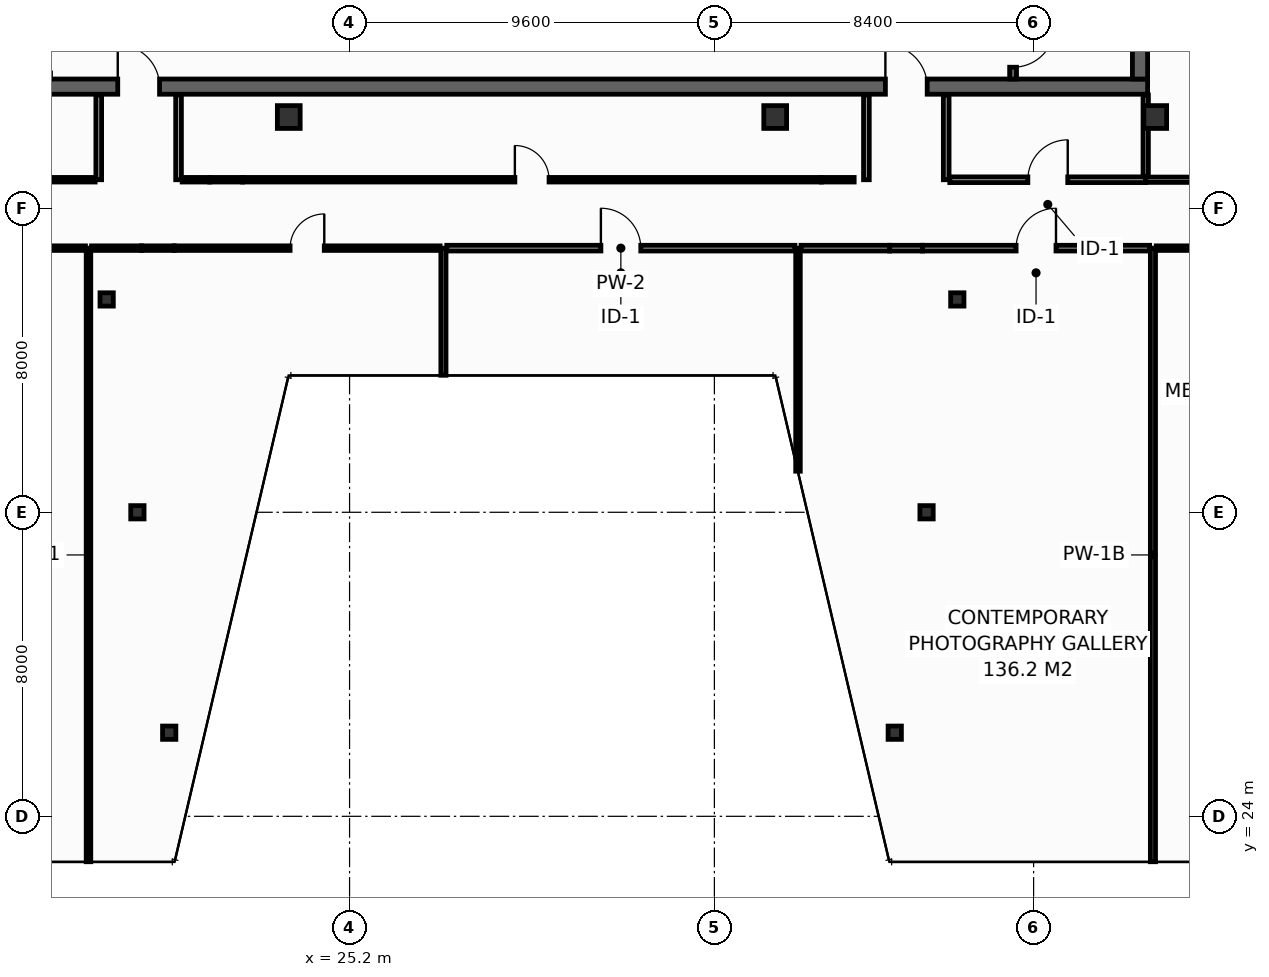
"""IFC4 building model, lengths in metres.
Left out: names, types, materials, properties, quantities, classifications, styles, units other than length and angle.
Written with IfcOpenShell. Run it as: python <this file> out.ifc"""

import sys

from ifc_helpers import new_model, si_unit, direction, frame, frame_2d, origin, origin_2d, place, context, subcontext, project, spatial, rectangle, hollow_rectangle, extrude, element, fill, save


model = new_model("IFC4")
c1 = context("Model", 3, precision=1e-05, world=origin(), true_north=direction((0.0, 1.0)))
c2 = subcontext(c1, "Body", "Model", "MODEL_VIEW")
j1 = project(units=[si_unit("LENGTHUNIT", "METRE"), si_unit("PLANEANGLEUNIT", "RADIAN")], contexts=[c1])
p1 = place(None, origin())
s1 = spatial("IfcSite", under=j1, at=p1, CompositionType="ELEMENT")
p2 = place(p1, origin())
s2 = spatial("IfcBuilding", under=s1, at=p2, CompositionType="ELEMENT")
p3 = place(p2, frame((0.0, 0.0, 272.4)))
s3 = spatial("IfcBuildingStorey", under=s2, at=p3, CompositionType="ELEMENT", Elevation=272.4)
p4 = place(p3, frame((13.7, 43.2, 0.0), z_axis=(0.0, 0.0, 1.0), x_axis=(1.0, 0.0, 0.0)))
e1 = element("IfcWall", 1, at=p4, inside=s3, PredefinedType="SHEAR", context=c2, shape_type="SweptSolid", body=[
    extrude(rectangle(XDim=32.5, YDim=0.4, at=frame_2d((16.25, 0.0))), origin(), (0.0, 0.0, 1.0), 3.35),
])
p5 = place(p4, frame((5.4, 0.0, 0.0)))
e2 = element("IfcOpeningElement", 2, at=p5, cuts=e1, PredefinedType="OPENING", context=c2, shape_type="SweptSolid", body=[
    extrude(rectangle(XDim=1.1, YDim=2.15, at=frame_2d((0.55, 1.075))), frame((0.0, 0.21, 0.0), z_axis=(0.0, -1.0, 0.0), x_axis=(1.0, 0.0, 0.0)), (0.0, 0.0, 1.0), 0.42),
])
p6 = place(p4, frame((25.6, 0.0, 0.0)))
e3 = element("IfcOpeningElement", 3, at=p6, cuts=e1, PredefinedType="OPENING", context=c2, shape_type="SweptSolid", body=[
    extrude(rectangle(XDim=1.1, YDim=2.15, at=frame_2d((0.55, 1.075))), frame((0.0, 0.21, 0.0), z_axis=(0.0, -1.0, 0.0), x_axis=(1.0, 0.0, 0.0)), (0.0, 0.0, 1.0), 0.42),
])
p7 = place(p3, frame((46.0, 43.4, 0.0), z_axis=(0.0, 0.0, 1.0), x_axis=(0.0, 1.0, 0.0)))
e4 = element("IfcWall", 4, at=p7, inside=s3, PredefinedType="SHEAR", context=c2, shape_type="SweptSolid", body=[
    extrude(rectangle(XDim=10.4, YDim=0.4, at=frame_2d((5.2, 0.0))), origin(), (0.0, 0.0, 1.0), 3.35),
])
for number, where, z_axis, x_axis in (
    (5, (23.6, 42.4, 0.0), (0.0, 0.0, 1.0), (1.0, 0.0, 0.0)),
    (6, (36.4, 42.4, 0.0), (0.0, 0.0, 1.0), (1.0, 0.0, 0.0)),
    (7, (46.4, 42.4, 0.0), (0.0, 0.0, 1.0), (1.0, 0.0, 0.0)),
):
    element("IfcColumn", number, at=place(p3, frame(where, z_axis=z_axis, x_axis=x_axis)), inside=s3, PredefinedType="COLUMN", context=c2, shape_type="SweptSolid", body=[
        extrude(hollow_rectangle(XDim=0.6, YDim=0.6, WallThickness=0.028, at=origin_2d()), origin(), (0.0, 0.0, 1.0), 3.8),
    ])
for number, where, z_axis, x_axis in (
    (8, (20.454, 26.2, 0.0), (0.0, 0.0, 1.0), (1.0, 0.0, 0.0)),
    (9, (39.546, 26.2, 0.0), (0.0, 0.0, 1.0), (1.0, 0.0, 0.0)),
    (10, (19.617, 32.0, 0.0), (0.0, 0.0, 1.0), (1.0, 0.0, 0.0)),
    (11, (40.383, 32.0, 0.0), (0.0, 0.0, 1.0), (1.0, 0.0, 0.0)),
    (12, (18.808, 37.6, 0.0), (0.0, 0.0, 1.0), (1.0, 0.0, 0.0)),
    (13, (41.192, 37.6, 0.0), (0.0, 0.0, 1.0), (1.0, 0.0, 0.0)),
):
    element("IfcColumn", number, at=place(p3, frame(where, z_axis=z_axis, x_axis=x_axis)), inside=s3, PredefinedType="COLUMN", context=c2, shape_type="SweptSolid", body=[
        extrude(hollow_rectangle(XDim=0.35, YDim=0.35, WallThickness=0.016, at=origin_2d()), origin(), (0.0, 0.0, 1.0), 3.8),
    ])
p8 = place(p3, frame((42.66, 53.8, 0.0), z_axis=(0.0, 0.0, 1.0), x_axis=(0.0, -1.0, 0.0)))
e14 = element("IfcWall", 14, at=p8, inside=s3, PredefinedType="SHEAR", context=c2, shape_type="SweptSolid", body=[
    extrude(rectangle(XDim=10.4, YDim=0.18, at=frame_2d((5.2, 0.0))), origin(), (0.0, 0.0, 1.0), 3.35),
])
p9 = place(p8, frame((8.99, 0.0, 0.0)))
e15 = element("IfcOpeningElement", 15, at=p9, cuts=e14, PredefinedType="OPENING", context=c2, shape_type="SweptSolid", body=[
    extrude(rectangle(XDim=1.1, YDim=2.15, at=frame_2d((0.55, 1.075))), frame((0.0, 0.1, 0.0), z_axis=(0.0, -1.0, 0.0), x_axis=(1.0, 0.0, 0.0)), (0.0, 0.0, 1.0), 0.2),
])
p10 = place(p3, frame((46.15, 40.75, 0.0), z_axis=(0.0, 0.0, 1.0), x_axis=(1.0, 0.0, 0.0)))
e16 = element("IfcWall", 16, at=p10, inside=s3, PredefinedType="PARTITIONING", context=c2, shape_type="SweptSolid", body=[
    extrude(rectangle(XDim=4.05, YDim=0.14, at=frame_2d((2.025, 0.0))), origin(), (0.0, 0.0, 1.0), 3.35),
])
p11 = place(p3, frame((46.15, 40.84, 0.0), z_axis=(0.0, 0.0, 1.0), x_axis=(0.0, 1.0, 0.0)))
e17 = element("IfcWall", 17, at=p11, inside=s3, PredefinedType="PARTITIONING", context=c2, shape_type="SweptSolid", body=[
    extrude(rectangle(XDim=2.14, YDim=0.14, at=frame_2d((1.07, 0.0))), origin(), (0.0, 0.0, 1.0), 3.35),
])
for number, where, z_axis, x_axis in (
    (18, (18.6, 40.75, 0.0), (0.0, 0.0, 1.0), (0.0, 1.0, 0.0)),
    (19, (20.7, 40.75, 0.0), (0.0, 0.0, 1.0), (0.0, 1.0, 0.0)),
    (20, (38.8, 40.75, 0.0), (0.0, 0.0, 1.0), (0.0, 1.0, 0.0)),
    (21, (40.9, 40.75, 0.0), (0.0, 0.0, 1.0), (0.0, 1.0, 0.0)),
):
    element("IfcWall", number, at=place(p3, frame(where, z_axis=z_axis, x_axis=x_axis)), inside=s3, PredefinedType="PARTITIONING", context=c2, shape_type="SweptSolid", body=[
        extrude(rectangle(XDim=2.23, YDim=0.15, at=frame_2d((1.115, 0.0))), origin(), (0.0, 0.0, 1.0), 3.35),
    ])
p12 = place(p3, frame((13.85, 40.75, 0.0), z_axis=(0.0, 0.0, 1.0), x_axis=(1.0, 0.0, 0.0)))
e22 = element("IfcWall", 22, at=p12, inside=s3, PredefinedType="PARTITIONING", context=c2, shape_type="SweptSolid", body=[
    extrude(rectangle(XDim=4.655, YDim=0.12, at=frame_2d((2.327, 0.0))), origin(), (0.0, 0.0, 1.0), 3.35),
])
p13 = place(p12, frame((1.877, 0.0, 0.0)))
e23 = element("IfcOpeningElement", 23, at=p13, cuts=e22, PredefinedType="OPENING", context=c2, shape_type="SweptSolid", body=[
    extrude(rectangle(XDim=0.9, YDim=2.1, at=frame_2d((0.45, 1.05))), frame((0.0, 0.07, 0.0), z_axis=(0.0, -1.0, 0.0), x_axis=(1.0, 0.0, 0.0)), (0.0, 0.0, 1.0), 0.14),
])
p14 = place(p3, frame((22.384, 40.75, 0.0), z_axis=(0.0, 0.0, 1.0), x_axis=(1.0, 0.0, 0.0)))
e24 = element("IfcWall", 24, at=p14, inside=s3, PredefinedType="PARTITIONING", context=c2, shape_type="SweptSolid", body=[
    extrude(rectangle(XDim=15.232, YDim=0.12, at=frame_2d((7.616, 0.0))), origin(), (0.0, 0.0, 1.0), 3.35),
])
p15 = place(p14, frame((7.166, 0.0, 0.0)))
e25 = element("IfcOpeningElement", 25, at=p15, cuts=e24, PredefinedType="OPENING", context=c2, shape_type="SweptSolid", body=[
    extrude(rectangle(XDim=0.9, YDim=2.1, at=frame_2d((0.45, 1.05))), frame((0.0, 0.07, 0.0), z_axis=(0.0, -1.0, 0.0), x_axis=(1.0, 0.0, 0.0)), (0.0, 0.0, 1.0), 0.14),
])
p16 = place(p3, frame((20.795, 40.75, 0.0), z_axis=(0.0, 0.0, 1.0), x_axis=(1.0, 0.0, 0.0)))
e26 = element("IfcWall", 26, at=p16, inside=s3, PredefinedType="PARTITIONING", context=c2, shape_type="SweptSolid", body=[
    extrude(rectangle(XDim=0.727, YDim=0.12, at=frame_2d((0.363, 0.0))), origin(), (0.0, 0.0, 1.0), 3.35),
])
for number, where, z_axis, x_axis in (
    (27, (21.522, 40.75, 0.0), (0.0, 0.0, 1.0), (1.0, 0.0, 0.0)),
    (28, (37.616, 40.75, 0.0), (0.0, 0.0, 1.0), (1.0, 0.0, 0.0)),
):
    element("IfcWall", number, at=place(p3, frame(where, z_axis=z_axis, x_axis=x_axis)), inside=s3, PredefinedType="PARTITIONING", context=c2, shape_type="SweptSolid", body=[
        extrude(rectangle(XDim=0.862, YDim=0.12, at=frame_2d((0.431, 0.0))), origin(), (0.0, 0.0, 1.0), 1.935),
    ])
p17 = place(p3, frame((40.995, 40.75, 0.0), z_axis=(0.0, 0.0, 1.0), x_axis=(1.0, 0.0, 0.0)))
e29 = element("IfcWall", 29, at=p17, inside=s3, PredefinedType="PARTITIONING", context=c2, shape_type="SweptSolid", body=[
    extrude(rectangle(XDim=5.155, YDim=0.15, at=frame_2d((2.577, 0.0))), origin(), (0.0, 0.0, 1.0), 3.35),
])
p18 = place(p17, frame((2.053, 0.0, 0.0)))
e30 = element("IfcOpeningElement", 30, at=p18, cuts=e29, PredefinedType="OPENING", context=c2, shape_type="SweptSolid", body=[
    extrude(rectangle(XDim=1.05, YDim=2.15, at=frame_2d((0.525, 1.075))), frame((0.0, 0.085, 0.0), z_axis=(0.0, -1.0, 0.0), x_axis=(1.0, 0.0, 0.0)), (0.0, 0.0, 1.0), 0.17),
])
p19 = place(p3, frame((18.33, 22.805, 0.0), z_axis=(0.0, 0.0, 1.0), x_axis=(0.0, 1.0, 0.0)))
e31 = element("IfcWall", 31, at=p19, inside=s3, PredefinedType="PARTITIONING", context=c2, shape_type="SweptSolid", body=[
    extrude(rectangle(XDim=16.145, YDim=0.12, at=frame_2d((8.073, 0.0))), origin(), (0.0, 0.0, 1.0), 1.535),
])
p20 = place(p3, frame((27.67, 35.605, 0.0), z_axis=(0.0, 0.0, 1.0), x_axis=(0.0, 1.0, 0.0)))
e32 = element("IfcWall", 32, at=p20, inside=s3, PredefinedType="PARTITIONING", context=c2, shape_type="SweptSolid", body=[
    extrude(rectangle(XDim=3.345, YDim=0.135, at=frame_2d((1.672, 0.0))), origin(), (0.0, 0.0, 1.0), 3.35),
])
p21 = place(p3, frame((37.0, 33.081, 0.0), z_axis=(0.0, 0.0, 1.0), x_axis=(0.0, 1.0, 0.0)))
e33 = element("IfcWall", 33, at=p21, inside=s3, PredefinedType="PARTITIONING", context=c2, shape_type="SweptSolid", body=[
    extrude(rectangle(XDim=5.869, YDim=0.12, at=frame_2d((2.935, 0.0))), origin(), (0.0, 0.0, 1.0), 3.35),
])
p22 = place(p3, frame((46.34, 22.805, 0.0), z_axis=(0.0, 0.0, 1.0), x_axis=(0.0, 1.0, 0.0)))
e34 = element("IfcWall", 34, at=p22, inside=s3, PredefinedType="PARTITIONING", context=c2, shape_type="SweptSolid", body=[
    extrude(rectangle(XDim=16.145, YDim=0.135, at=frame_2d((8.073, 0.0))), origin(), (0.0, 0.0, 1.0), 1.535),
])
p23 = place(p3, frame((6.483, 38.95, 0.0), z_axis=(0.0, 0.0, 1.0), x_axis=(1.0, 0.0, 0.0)))
e35 = element("IfcWall", 35, at=p23, inside=s3, PredefinedType="PARTITIONING", context=c2, shape_type="SweptSolid", body=[
    extrude(rectangle(XDim=11.767, YDim=0.12, at=frame_2d((5.883, 0.0))), origin(), (0.0, 0.0, 1.0), 2.885),
])
p24 = place(p23, frame((5.433, 0.0, 0.0)))
e36 = element("IfcOpeningElement", 36, at=p24, cuts=e35, PredefinedType="OPENING", context=c2, shape_type="SweptSolid", body=[
    extrude(rectangle(XDim=0.9, YDim=2.1, at=frame_2d((0.45, 1.05))), frame((0.0, 0.07, 0.0), z_axis=(0.0, -1.0, 0.0), x_axis=(1.0, 0.0, 0.0)), (0.0, 0.0, 1.0), 0.14),
])
p25 = place(p3, frame((20.587, 38.95, 0.0), z_axis=(0.0, 0.0, 1.0), x_axis=(1.0, 0.0, 0.0)))
e37 = element("IfcWall", 37, at=p25, inside=s3, PredefinedType="PARTITIONING", context=c2, shape_type="SweptSolid", body=[
    extrude(rectangle(XDim=6.996, YDim=0.12, at=frame_2d((3.498, 0.0))), origin(), (0.0, 0.0, 1.0), 3.35),
])
p26 = place(p25, frame((3.048, 0.0, 0.0)))
e38 = element("IfcOpeningElement", 38, at=p26, cuts=e37, PredefinedType="OPENING", context=c2, shape_type="SweptSolid", body=[
    extrude(rectangle(XDim=0.9, YDim=2.1, at=frame_2d((0.45, 1.05))), frame((0.0, 0.07, 0.0), z_axis=(0.0, -1.0, 0.0), x_axis=(1.0, 0.0, 0.0)), (0.0, 0.0, 1.0), 0.14),
])
p27 = place(p3, frame((18.41, 38.95, 0.0), z_axis=(0.0, 0.0, 1.0), x_axis=(1.0, 0.0, 0.0)))
e39 = element("IfcWall", 39, at=p27, inside=s3, PredefinedType="PARTITIONING", context=c2, shape_type="SweptSolid", body=[
    extrude(rectangle(XDim=1.315, YDim=0.12, at=frame_2d((0.657, 0.0))), origin(), (0.0, 0.0, 1.0), 3.35),
])
p28 = place(p3, frame((19.725, 38.95, 0.0), z_axis=(0.0, 0.0, 1.0), x_axis=(1.0, 0.0, 0.0)))
e40 = element("IfcWall", 40, at=p28, inside=s3, PredefinedType="PARTITIONING", context=c2, shape_type="SweptSolid", body=[
    extrude(rectangle(XDim=0.862, YDim=0.12, at=frame_2d((0.431, 0.0))), origin(), (0.0, 0.0, 1.0), 1.935),
])
p29 = place(p3, frame((27.758, 38.95, 0.0), z_axis=(0.0, 0.0, 1.0), x_axis=(1.0, 0.0, 0.0)))
e41 = element("IfcWall", 41, at=p29, inside=s3, PredefinedType="PARTITIONING", context=c2, shape_type="SweptSolid", body=[
    extrude(rectangle(XDim=9.162, YDim=0.15, at=frame_2d((4.581, 0.0))), origin(), (0.0, 0.0, 1.0), 3.35),
])
p30 = place(p29, frame((4.056, 0.0, 0.0)))
e42 = element("IfcOpeningElement", 42, at=p30, cuts=e41, PredefinedType="OPENING", context=c2, shape_type="SweptSolid", body=[
    extrude(rectangle(XDim=1.05, YDim=2.15, at=frame_2d((0.525, 1.075))), frame((0.0, 0.085, 0.0), z_axis=(0.0, -1.0, 0.0), x_axis=(1.0, 0.0, 0.0)), (0.0, 0.0, 1.0), 0.17),
])
p31 = place(p3, frame((40.275, 38.95, 0.0), z_axis=(0.0, 0.0, 1.0), x_axis=(1.0, 0.0, 0.0)))
e43 = element("IfcWall", 43, at=p31, inside=s3, PredefinedType="PARTITIONING", context=c2, shape_type="SweptSolid", body=[
    extrude(rectangle(XDim=5.977, YDim=0.15, at=frame_2d((2.989, 0.0))), origin(), (0.0, 0.0, 1.0), 3.35),
])
p32 = place(p31, frame((2.464, 0.0, 0.0)))
e44 = element("IfcOpeningElement", 44, at=p32, cuts=e43, PredefinedType="OPENING", context=c2, shape_type="SweptSolid", body=[
    extrude(rectangle(XDim=1.05, YDim=2.15, at=frame_2d((0.525, 1.075))), frame((0.0, 0.085, 0.0), z_axis=(0.0, -1.0, 0.0), x_axis=(1.0, 0.0, 0.0)), (0.0, 0.0, 1.0), 0.17),
])
p33 = place(p3, frame((37.08, 38.95, 0.0), z_axis=(0.0, 0.0, 1.0), x_axis=(1.0, 0.0, 0.0)))
e45 = element("IfcWall", 45, at=p33, inside=s3, PredefinedType="PARTITIONING", context=c2, shape_type="SweptSolid", body=[
    extrude(rectangle(XDim=2.333, YDim=0.15, at=frame_2d((1.167, 0.0))), origin(), (0.0, 0.0, 1.0), 3.35),
])
p34 = place(p3, frame((39.413, 38.95, 0.0), z_axis=(0.0, 0.0, 1.0), x_axis=(1.0, 0.0, 0.0)))
e46 = element("IfcWall", 46, at=p34, inside=s3, PredefinedType="PARTITIONING", context=c2, shape_type="SweptSolid", body=[
    extrude(rectangle(XDim=0.862, YDim=0.15, at=frame_2d((0.431, 0.0))), origin(), (0.0, 0.0, 1.0), 1.935),
])
p35 = place(p3, frame((46.427, 38.95, 0.0), z_axis=(0.0, 0.0, 1.0), x_axis=(1.0, 0.0, 0.0)))
e47 = element("IfcWall", 47, at=p35, inside=s3, PredefinedType="PARTITIONING", context=c2, shape_type="SweptSolid", body=[
    extrude(rectangle(XDim=7.089, YDim=0.12, at=frame_2d((3.544, 0.0))), origin(), (0.0, 0.0, 1.0), 2.885),
])
p36 = place(p35, frame((3.095, 0.0, 0.0)))
e48 = element("IfcOpeningElement", 48, at=p36, cuts=e47, PredefinedType="OPENING", context=c2, shape_type="SweptSolid", body=[
    extrude(rectangle(XDim=0.9, YDim=2.1, at=frame_2d((0.45, 1.05))), frame((0.0, 0.07, 0.0), z_axis=(0.0, -1.0, 0.0), x_axis=(1.0, 0.0, 0.0)), (0.0, 0.0, 1.0), 0.14),
])
p37 = place(p9, origin())
e49 = element("IfcDoor", 49, at=p37, inside=s3, OperationType="SINGLE_SWING_LEFT", PredefinedType="DOOR", context=c2, shape_type="SweptSolid", body=[
    extrude(rectangle(XDim=1.1, YDim=2.15, at=frame_2d((0.55, 1.075))), frame((0.0, 0.025, 0.0), z_axis=(0.0, -1.0, 0.0), x_axis=(1.0, 0.0, 0.0)), (0.0, 0.0, 1.0), 0.05),
])
fill(e15, e49)
p38 = place(p5, origin())
e50 = element("IfcDoor", 50, at=p38, inside=s3, OperationType="SINGLE_SWING_LEFT", PredefinedType="DOOR", context=c2, shape_type="SweptSolid", body=[
    extrude(rectangle(XDim=1.1, YDim=2.15, at=frame_2d((0.55, 1.075))), frame((0.0, 0.025, 0.0), z_axis=(0.0, -1.0, 0.0), x_axis=(1.0, 0.0, 0.0)), (0.0, 0.0, 1.0), 0.05),
])
fill(e2, e50)
p39 = place(p6, origin())
e51 = element("IfcDoor", 51, at=p39, inside=s3, OperationType="SINGLE_SWING_LEFT", PredefinedType="DOOR", context=c2, shape_type="SweptSolid", body=[
    extrude(rectangle(XDim=1.1, YDim=2.15, at=frame_2d((0.55, 1.075))), frame((0.0, 0.025, 0.0), z_axis=(0.0, -1.0, 0.0), x_axis=(1.0, 0.0, 0.0)), (0.0, 0.0, 1.0), 0.05),
])
fill(e3, e51)
p40 = place(p15, origin())
e52 = element("IfcDoor", 52, at=p40, inside=s3, OperationType="SINGLE_SWING_LEFT", PredefinedType="DOOR", context=c2, shape_type="SweptSolid", body=[
    extrude(rectangle(XDim=0.9, YDim=2.1, at=frame_2d((0.45, 1.05))), frame((0.0, 0.025, 0.0), z_axis=(0.0, -1.0, 0.0), x_axis=(1.0, 0.0, 0.0)), (0.0, 0.0, 1.0), 0.05),
])
fill(e25, e52)
p41 = place(p18, origin())
e53 = element("IfcDoor", 53, at=p41, inside=s3, OperationType="SINGLE_SWING_RIGHT", PredefinedType="DOOR", context=c2, shape_type="SweptSolid", body=[
    extrude(rectangle(XDim=1.05, YDim=2.15, at=frame_2d((0.525, 1.075))), frame((0.0, 0.025, 0.0), z_axis=(0.0, -1.0, 0.0), x_axis=(1.0, 0.0, 0.0)), (0.0, 0.0, 1.0), 0.05),
])
fill(e30, e53)
p42 = place(p26, origin())
e54 = element("IfcDoor", 54, at=p42, inside=s3, OperationType="SINGLE_SWING_RIGHT", PredefinedType="DOOR", context=c2, shape_type="SweptSolid", body=[
    extrude(rectangle(XDim=0.9, YDim=2.1, at=frame_2d((0.45, 1.05))), frame((0.0, 0.025, 0.0), z_axis=(0.0, -1.0, 0.0), x_axis=(1.0, 0.0, 0.0)), (0.0, 0.0, 1.0), 0.05),
])
fill(e38, e54)
p43 = place(p30, origin())
e55 = element("IfcDoor", 55, at=p43, inside=s3, OperationType="SINGLE_SWING_LEFT", PredefinedType="DOOR", context=c2, shape_type="SweptSolid", body=[
    extrude(rectangle(XDim=1.05, YDim=2.15, at=frame_2d((0.525, 1.075))), frame((0.0, 0.025, 0.0), z_axis=(0.0, -1.0, 0.0), x_axis=(1.0, 0.0, 0.0)), (0.0, 0.0, 1.0), 0.05),
])
fill(e42, e55)
p44 = place(p32, origin())
e56 = element("IfcDoor", 56, at=p44, inside=s3, OperationType="SINGLE_SWING_RIGHT", PredefinedType="DOOR", context=c2, shape_type="SweptSolid", body=[
    extrude(rectangle(XDim=1.05, YDim=2.15, at=frame_2d((0.525, 1.075))), frame((0.0, 0.025, 0.0), z_axis=(0.0, -1.0, 0.0), x_axis=(1.0, 0.0, 0.0)), (0.0, 0.0, 1.0), 0.05),
])
fill(e44, e56)
save(model, sys.argv[1])
